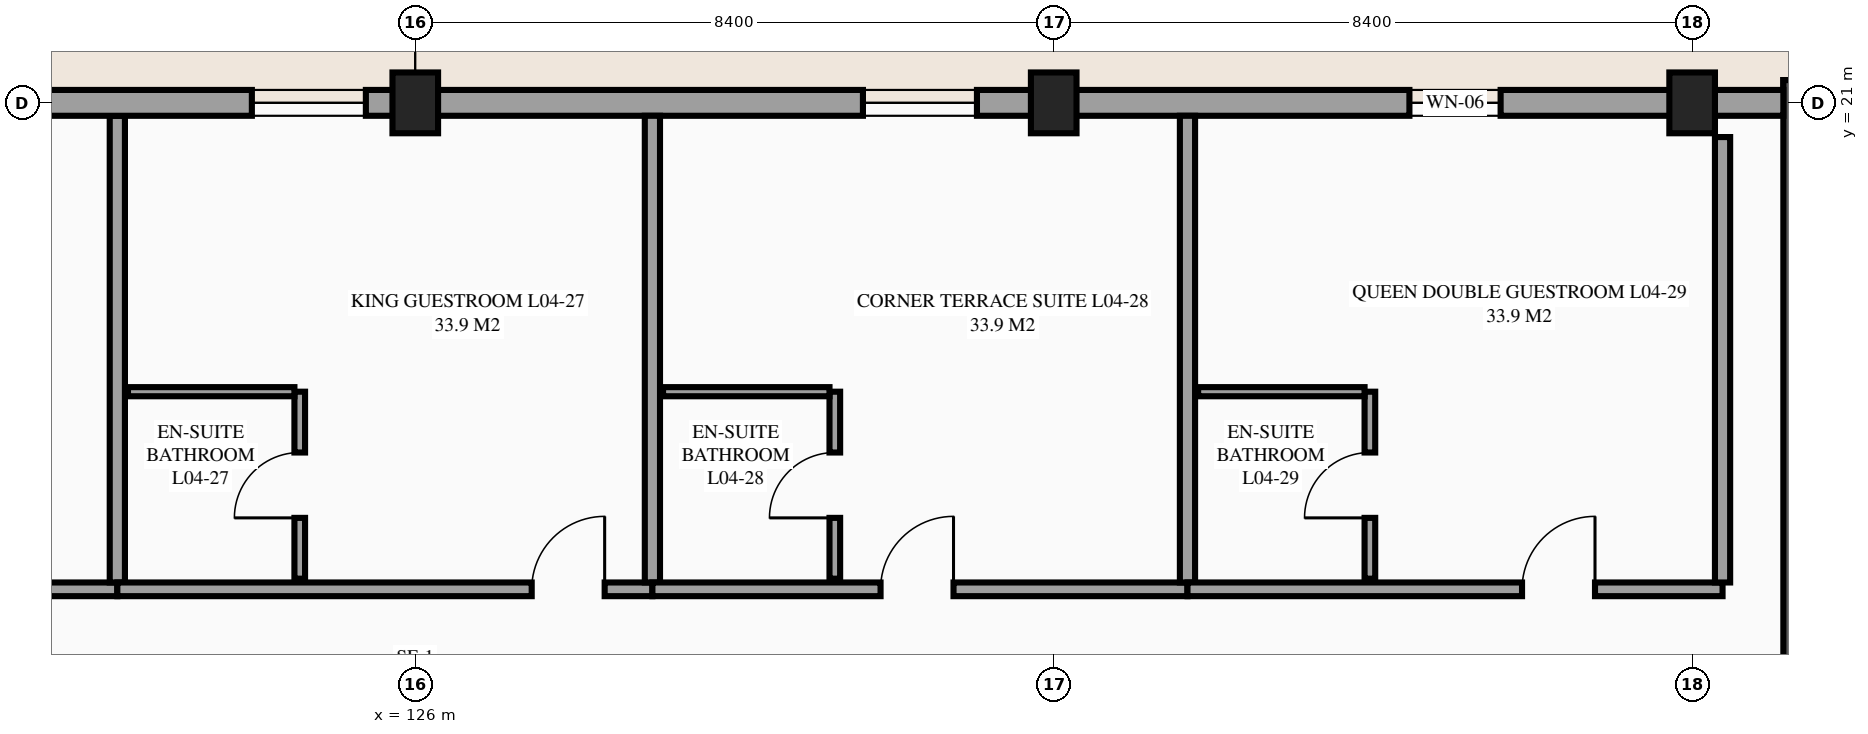
"""IFC4 building model, lengths in metres.
Left out: names, types, materials, properties, quantities, classifications, styles, units other than length and angle.
Written with IfcOpenShell. Run it as: python <this file> out.ifc"""

import sys

from ifc_helpers import new_model, si_unit, direction, frame, frame_2d, origin, origin_2d, place, context, subcontext, project, spatial, rectangle, extrude, element, fill, save


model = new_model("IFC4")
c1 = context("Model", 3, precision=1e-05, world=origin(), true_north=direction((0.0, 1.0)))
c2 = subcontext(c1, "Body", "Model", "MODEL_VIEW")
j1 = project(units=[si_unit("LENGTHUNIT", "METRE"), si_unit("PLANEANGLEUNIT", "RADIAN")], contexts=[c1])
p1 = place(None, origin())
s1 = spatial("IfcSite", under=j1, at=p1, CompositionType="ELEMENT")
p2 = place(p1, origin())
s2 = spatial("IfcBuilding", under=s1, at=p2, CompositionType="ELEMENT")
p3 = place(p2, frame((0.0, 0.0, 18.3)))
s3 = spatial("IfcBuildingStorey", under=s2, at=p3, CompositionType="ELEMENT", Elevation=18.3)
for number, where, z_axis, x_axis in (
    (1, (126.0, 21.0, 0.0), (0.0, 0.0, 1.0), (1.0, 0.0, 0.0)),
    (2, (134.4, 21.0, 0.0), (0.0, 0.0, 1.0), (1.0, 0.0, 0.0)),
    (3, (142.8, 21.0, 0.0), (0.0, 0.0, 1.0), (1.0, 0.0, 0.0)),
):
    element("IfcColumn", number, at=place(p3, frame(where, z_axis=z_axis, x_axis=x_axis)), inside=s3, PredefinedType="COLUMN", context=c2, shape_type="SweptSolid", body=[
        extrude(rectangle(XDim=0.6, YDim=0.8, at=origin_2d()), origin(), (0.0, 0.0, 1.0), 3.6),
    ])
p4 = place(p3, frame((142.8, 21.0, 0.0), z_axis=(0.0, 0.0, 1.0), x_axis=(-1.0, 0.0, 0.0)))
e4 = element("IfcWall", 4, at=p4, inside=s3, PredefinedType="STANDARD", context=c2, shape_type="SweptSolid", body=[
    extrude(rectangle(XDim=16.8, YDim=0.34, at=frame_2d((8.4, 0.0))), origin(), (0.0, 0.0, 1.0), 2.53),
])
p5 = place(p4, frame((9.41, 0.0, 0.85)))
e5 = element("IfcOpeningElement", 5, at=p5, cuts=e4, PredefinedType="OPENING", context=c2, shape_type="SweptSolid", body=[
    extrude(rectangle(XDim=1.5, YDim=1.5, at=frame_2d((0.75, 0.75))), frame((0.0, 0.18, 0.0), z_axis=(0.0, -1.0, 0.0), x_axis=(1.0, 0.0, 0.0)), (0.0, 0.0, 1.0), 0.36),
])
p6 = place(p4, frame((2.52, 0.0, 0.85)))
e6 = element("IfcOpeningElement", 6, at=p6, cuts=e4, PredefinedType="OPENING", context=c2, shape_type="SweptSolid", body=[
    extrude(rectangle(XDim=1.2, YDim=1.5, at=frame_2d((0.6, 0.75))), frame((0.0, 0.18, 0.0), z_axis=(0.0, -1.0, 0.0), x_axis=(1.0, 0.0, 0.0)), (0.0, 0.0, 1.0), 0.36),
])
p7 = place(p3, frame((149.2, 21.15, 0.0), z_axis=(0.0, 0.0, 1.0), x_axis=(-1.0, 0.0, 0.0)))
e7 = element("IfcWall", 7, at=p7, inside=s3, PredefinedType="SHEAR", context=c2, shape_type="SweptSolid", body=[
    extrude(rectangle(XDim=5.2, YDim=0.3, at=frame_2d((2.6, 0.0))), origin(), (0.0, 0.0, 1.0), 3.6),
])
p8 = place(p3, frame((144.15, 21.3, 0.0), z_axis=(0.0, 0.0, 1.0), x_axis=(0.0, -1.0, 0.0)))
e8 = element("IfcWall", 8, at=p8, inside=s3, PredefinedType="SHEAR", context=c2, shape_type="SweptSolid", body=[
    extrude(rectangle(XDim=8.84, YDim=0.3, at=frame_2d((4.42, 0.0))), origin(), (0.0, 0.0, 1.0), 3.6),
])
p9 = place(p3, frame((115.04, 14.6, 0.0), z_axis=(0.0, 0.0, 1.0), x_axis=(1.0, 0.0, 0.0)))
e9 = element("IfcWall", 9, at=p9, inside=s3, PredefinedType="PARTITIONING", context=c2, shape_type="SweptSolid", body=[
    extrude(rectangle(XDim=7.04, YDim=0.18, at=frame_2d((3.52, 0.0))), origin(), (0.0, 0.0, 1.0), 3.375),
])
p10 = place(p9, frame((4.752, 0.0, 0.0)))
e10 = element("IfcOpeningElement", 10, at=p10, cuts=e9, PredefinedType="OPENING", context=c2, shape_type="SweptSolid", body=[
    extrude(rectangle(XDim=0.96, YDim=2.15, at=frame_2d((0.48, 1.075))), frame((0.0, 0.1, 0.0), z_axis=(0.0, -1.0, 0.0), x_axis=(1.0, 0.0, 0.0)), (0.0, 0.0, 1.0), 0.2),
])
p11 = place(p3, frame((122.08, 14.69, 0.0), z_axis=(0.0, 0.0, 1.0), x_axis=(0.0, 1.0, 0.0)))
e11 = element("IfcWall", 11, at=p11, inside=s3, PredefinedType="PARTITIONING", context=c2, shape_type="SweptSolid", body=[
    extrude(rectangle(XDim=6.14, YDim=0.2, at=frame_2d((3.07, 0.0))), origin(), (0.0, 0.0, 1.0), 3.375),
])
p12 = place(p3, frame((122.08, 14.6, 0.0), z_axis=(0.0, 0.0, 1.0), x_axis=(1.0, 0.0, 0.0)))
e12 = element("IfcWall", 12, at=p12, inside=s3, PredefinedType="PARTITIONING", context=c2, shape_type="SweptSolid", body=[
    extrude(rectangle(XDim=7.04, YDim=0.18, at=frame_2d((3.52, 0.0))), origin(), (0.0, 0.0, 1.0), 3.375),
])
p13 = place(p12, frame((5.452, 0.0, 0.0)))
e13 = element("IfcOpeningElement", 13, at=p13, cuts=e12, PredefinedType="OPENING", context=c2, shape_type="SweptSolid", body=[
    extrude(rectangle(XDim=0.96, YDim=2.15, at=frame_2d((0.48, 1.075))), frame((0.0, 0.1, 0.0), z_axis=(0.0, -1.0, 0.0), x_axis=(1.0, 0.0, 0.0)), (0.0, 0.0, 1.0), 0.2),
])
p14 = place(p3, frame((129.12, 14.69, 0.0), z_axis=(0.0, 0.0, 1.0), x_axis=(0.0, 1.0, 0.0)))
e14 = element("IfcWall", 14, at=p14, inside=s3, PredefinedType="PARTITIONING", context=c2, shape_type="SweptSolid", body=[
    extrude(rectangle(XDim=6.14, YDim=0.2, at=frame_2d((3.07, 0.0))), origin(), (0.0, 0.0, 1.0), 3.375),
])
p15 = place(p3, frame((124.48, 14.74, 0.0), z_axis=(0.0, 0.0, 1.0), x_axis=(0.0, 1.0, 0.0)))
e15 = element("IfcWall", 15, at=p15, inside=s3, PredefinedType="PARTITIONING", context=c2, shape_type="SweptSolid", body=[
    extrude(rectangle(XDim=2.46, YDim=0.14, at=frame_2d((1.23, 0.0))), origin(), (0.0, 0.0, 1.0), 3.375),
])
p16 = place(p15, frame((0.8, 0.0, 0.0)))
e16 = element("IfcOpeningElement", 16, at=p16, cuts=e15, PredefinedType="OPENING", context=c2, shape_type="SweptSolid", body=[
    extrude(rectangle(XDim=0.86, YDim=2.1, at=frame_2d((0.43, 1.05))), frame((0.0, 0.08, 0.0), z_axis=(0.0, -1.0, 0.0), x_axis=(1.0, 0.0, 0.0)), (0.0, 0.0, 1.0), 0.16),
])
p17 = place(p3, frame((122.22, 17.2, 0.0), z_axis=(0.0, 0.0, 1.0), x_axis=(1.0, 0.0, 0.0)))
e17 = element("IfcWall", 17, at=p17, inside=s3, PredefinedType="PARTITIONING", context=c2, shape_type="SweptSolid", body=[
    extrude(rectangle(XDim=2.19, YDim=0.12, at=frame_2d((1.095, 0.0))), origin(), (0.0, 0.0, 1.0), 3.375),
])
p18 = place(p3, frame((129.12, 14.6, 0.0), z_axis=(0.0, 0.0, 1.0), x_axis=(1.0, 0.0, 0.0)))
e18 = element("IfcWall", 18, at=p18, inside=s3, PredefinedType="PARTITIONING", context=c2, shape_type="SweptSolid", body=[
    extrude(rectangle(XDim=7.04, YDim=0.18, at=frame_2d((3.52, 0.0))), origin(), (0.0, 0.0, 1.0), 3.375),
])
p19 = place(p18, frame((3.002, 0.0, 0.0)))
e19 = element("IfcOpeningElement", 19, at=p19, cuts=e18, PredefinedType="OPENING", context=c2, shape_type="SweptSolid", body=[
    extrude(rectangle(XDim=0.96, YDim=2.15, at=frame_2d((0.48, 1.075))), frame((0.0, 0.1, 0.0), z_axis=(0.0, -1.0, 0.0), x_axis=(1.0, 0.0, 0.0)), (0.0, 0.0, 1.0), 0.2),
])
p20 = place(p3, frame((136.16, 14.69, 0.0), z_axis=(0.0, 0.0, 1.0), x_axis=(0.0, 1.0, 0.0)))
e20 = element("IfcWall", 20, at=p20, inside=s3, PredefinedType="PARTITIONING", context=c2, shape_type="SweptSolid", body=[
    extrude(rectangle(XDim=6.14, YDim=0.2, at=frame_2d((3.07, 0.0))), origin(), (0.0, 0.0, 1.0), 3.375),
])
p21 = place(p3, frame((131.52, 14.74, 0.0), z_axis=(0.0, 0.0, 1.0), x_axis=(0.0, 1.0, 0.0)))
e21 = element("IfcWall", 21, at=p21, inside=s3, PredefinedType="PARTITIONING", context=c2, shape_type="SweptSolid", body=[
    extrude(rectangle(XDim=2.46, YDim=0.14, at=frame_2d((1.23, 0.0))), origin(), (0.0, 0.0, 1.0), 3.375),
])
p22 = place(p21, frame((0.8, 0.0, 0.0)))
e22 = element("IfcOpeningElement", 22, at=p22, cuts=e21, PredefinedType="OPENING", context=c2, shape_type="SweptSolid", body=[
    extrude(rectangle(XDim=0.86, YDim=2.1, at=frame_2d((0.43, 1.05))), frame((0.0, 0.08, 0.0), z_axis=(0.0, -1.0, 0.0), x_axis=(1.0, 0.0, 0.0)), (0.0, 0.0, 1.0), 0.16),
])
p23 = place(p3, frame((129.26, 17.2, 0.0), z_axis=(0.0, 0.0, 1.0), x_axis=(1.0, 0.0, 0.0)))
e23 = element("IfcWall", 23, at=p23, inside=s3, PredefinedType="PARTITIONING", context=c2, shape_type="SweptSolid", body=[
    extrude(rectangle(XDim=2.19, YDim=0.12, at=frame_2d((1.095, 0.0))), origin(), (0.0, 0.0, 1.0), 3.375),
])
p24 = place(p3, frame((136.16, 14.6, 0.0), z_axis=(0.0, 0.0, 1.0), x_axis=(1.0, 0.0, 0.0)))
e24 = element("IfcWall", 24, at=p24, inside=s3, PredefinedType="PARTITIONING", context=c2, shape_type="SweptSolid", body=[
    extrude(rectangle(XDim=7.04, YDim=0.18, at=frame_2d((3.52, 0.0))), origin(), (0.0, 0.0, 1.0), 3.375),
])
p25 = place(p24, frame((4.402, 0.0, 0.0)))
e25 = element("IfcOpeningElement", 25, at=p25, cuts=e24, PredefinedType="OPENING", context=c2, shape_type="SweptSolid", body=[
    extrude(rectangle(XDim=0.96, YDim=2.15, at=frame_2d((0.48, 1.075))), frame((0.0, 0.1, 0.0), z_axis=(0.0, -1.0, 0.0), x_axis=(1.0, 0.0, 0.0)), (0.0, 0.0, 1.0), 0.2),
])
p26 = place(p3, frame((143.2, 14.69, 0.0), z_axis=(0.0, 0.0, 1.0), x_axis=(0.0, 1.0, 0.0)))
e26 = element("IfcWall", 26, at=p26, inside=s3, PredefinedType="PARTITIONING", context=c2, shape_type="SweptSolid", body=[
    extrude(rectangle(XDim=5.86, YDim=0.2, at=frame_2d((2.93, 0.0))), origin(), (0.0, 0.0, 1.0), 3.375),
])
p27 = place(p3, frame((138.56, 14.74, 0.0), z_axis=(0.0, 0.0, 1.0), x_axis=(0.0, 1.0, 0.0)))
e27 = element("IfcWall", 27, at=p27, inside=s3, PredefinedType="PARTITIONING", context=c2, shape_type="SweptSolid", body=[
    extrude(rectangle(XDim=2.46, YDim=0.14, at=frame_2d((1.23, 0.0))), origin(), (0.0, 0.0, 1.0), 3.375),
])
p28 = place(p27, frame((0.8, 0.0, 0.0)))
e28 = element("IfcOpeningElement", 28, at=p28, cuts=e27, PredefinedType="OPENING", context=c2, shape_type="SweptSolid", body=[
    extrude(rectangle(XDim=0.86, YDim=2.1, at=frame_2d((0.43, 1.05))), frame((0.0, 0.08, 0.0), z_axis=(0.0, -1.0, 0.0), x_axis=(1.0, 0.0, 0.0)), (0.0, 0.0, 1.0), 0.16),
])
p29 = place(p3, frame((136.3, 17.2, 0.0), z_axis=(0.0, 0.0, 1.0), x_axis=(1.0, 0.0, 0.0)))
e29 = element("IfcWall", 29, at=p29, inside=s3, PredefinedType="PARTITIONING", context=c2, shape_type="SweptSolid", body=[
    extrude(rectangle(XDim=2.19, YDim=0.12, at=frame_2d((1.095, 0.0))), origin(), (0.0, 0.0, 1.0), 3.375),
])
p30 = place(p3, frame((144.0, 21.0, 0.0), z_axis=(0.0, 0.0, 1.0), x_axis=(-1.0, 0.0, 0.0)))
e30 = element("IfcWall", 30, at=p30, inside=s3, PredefinedType="STANDARD", context=c2, shape_type="SweptSolid", body=[
    extrude(rectangle(XDim=1.2, YDim=0.34, at=frame_2d((0.6, 0.0))), origin(), (0.0, 0.0, 1.0), 2.88),
])
p31 = place(p3, frame((126.0, 21.0, 0.0), z_axis=(0.0, 0.0, 1.0), x_axis=(-1.0, 0.0, 0.0)))
e31 = element("IfcWall", 31, at=p31, inside=s3, PredefinedType="STANDARD", context=c2, shape_type="SweptSolid", body=[
    extrude(rectangle(XDim=8.4, YDim=0.34, at=frame_2d((4.2, 0.0))), origin(), (0.0, 0.0, 1.0), 3.133),
])
p32 = place(p31, frame((6.19, 0.0, 0.85)))
e32 = element("IfcOpeningElement", 32, at=p32, cuts=e31, PredefinedType="OPENING", context=c2, shape_type="SweptSolid", body=[
    extrude(rectangle(XDim=1.5, YDim=1.5, at=frame_2d((0.75, 0.75))), frame((0.0, 0.18, 0.0), z_axis=(0.0, -1.0, 0.0), x_axis=(1.0, 0.0, 0.0)), (0.0, 0.0, 1.0), 0.36),
])
p33 = place(p31, frame((0.65, 0.0, 0.85)))
e33 = element("IfcOpeningElement", 33, at=p33, cuts=e31, PredefinedType="OPENING", context=c2, shape_type="SweptSolid", body=[
    extrude(rectangle(XDim=1.5, YDim=1.5, at=frame_2d((0.75, 0.75))), frame((0.0, 0.18, 0.0), z_axis=(0.0, -1.0, 0.0), x_axis=(1.0, 0.0, 0.0)), (0.0, 0.0, 1.0), 0.36),
])
p34 = place(p33, origin())
e34 = element("IfcWindow", 34, at=p34, inside=s3, PartitioningType="SINGLE_PANEL", PredefinedType="WINDOW", context=c2, shape_type="SweptSolid", body=[
    extrude(rectangle(XDim=1.5, YDim=1.5, at=frame_2d((0.75, 0.75))), frame((0.0, 0.03, 0.0), z_axis=(0.0, -1.0, 0.0), x_axis=(1.0, 0.0, 0.0)), (0.0, 0.0, 1.0), 0.06),
])
fill(e33, e34)
p35 = place(p5, origin())
e35 = element("IfcWindow", 35, at=p35, inside=s3, PartitioningType="SINGLE_PANEL", PredefinedType="WINDOW", context=c2, shape_type="SweptSolid", body=[
    extrude(rectangle(XDim=1.5, YDim=1.5, at=frame_2d((0.75, 0.75))), frame((0.0, 0.03, 0.0), z_axis=(0.0, -1.0, 0.0), x_axis=(1.0, 0.0, 0.0)), (0.0, 0.0, 1.0), 0.06),
])
fill(e5, e35)
p36 = place(p6, origin())
e36 = element("IfcWindow", 36, at=p36, inside=s3, PartitioningType="SINGLE_PANEL", PredefinedType="WINDOW", context=c2, shape_type="SweptSolid", body=[
    extrude(rectangle(XDim=1.2, YDim=1.5, at=frame_2d((0.6, 0.75))), frame((0.0, 0.03, 0.0), z_axis=(0.0, -1.0, 0.0), x_axis=(1.0, 0.0, 0.0)), (0.0, 0.0, 1.0), 0.06),
])
fill(e6, e36)
p37 = place(p13, origin())
e37 = element("IfcDoor", 37, at=p37, inside=s3, OperationType="SINGLE_SWING_RIGHT", PredefinedType="DOOR", context=c2, shape_type="SweptSolid", body=[
    extrude(rectangle(XDim=0.96, YDim=2.15, at=frame_2d((0.48, 1.075))), frame((0.0, 0.025, 0.0), z_axis=(0.0, -1.0, 0.0), x_axis=(1.0, 0.0, 0.0)), (0.0, 0.0, 1.0), 0.05),
])
fill(e13, e37)
p38 = place(p16, origin())
e38 = element("IfcDoor", 38, at=p38, inside=s3, OperationType="SINGLE_SWING_LEFT", PredefinedType="DOOR", context=c2, shape_type="SweptSolid", body=[
    extrude(rectangle(XDim=0.86, YDim=2.1, at=frame_2d((0.43, 1.05))), frame((0.0, 0.025, 0.0), z_axis=(0.0, -1.0, 0.0), x_axis=(1.0, 0.0, 0.0)), (0.0, 0.0, 1.0), 0.05),
])
fill(e16, e38)
p39 = place(p19, origin())
e39 = element("IfcDoor", 39, at=p39, inside=s3, OperationType="SINGLE_SWING_RIGHT", PredefinedType="DOOR", context=c2, shape_type="SweptSolid", body=[
    extrude(rectangle(XDim=0.96, YDim=2.15, at=frame_2d((0.48, 1.075))), frame((0.0, 0.025, 0.0), z_axis=(0.0, -1.0, 0.0), x_axis=(1.0, 0.0, 0.0)), (0.0, 0.0, 1.0), 0.05),
])
fill(e19, e39)
p40 = place(p22, origin())
e40 = element("IfcDoor", 40, at=p40, inside=s3, OperationType="SINGLE_SWING_LEFT", PredefinedType="DOOR", context=c2, shape_type="SweptSolid", body=[
    extrude(rectangle(XDim=0.86, YDim=2.1, at=frame_2d((0.43, 1.05))), frame((0.0, 0.025, 0.0), z_axis=(0.0, -1.0, 0.0), x_axis=(1.0, 0.0, 0.0)), (0.0, 0.0, 1.0), 0.05),
])
fill(e22, e40)
p41 = place(p25, origin())
e41 = element("IfcDoor", 41, at=p41, inside=s3, OperationType="SINGLE_SWING_RIGHT", PredefinedType="DOOR", context=c2, shape_type="SweptSolid", body=[
    extrude(rectangle(XDim=0.96, YDim=2.15, at=frame_2d((0.48, 1.075))), frame((0.0, 0.025, 0.0), z_axis=(0.0, -1.0, 0.0), x_axis=(1.0, 0.0, 0.0)), (0.0, 0.0, 1.0), 0.05),
])
fill(e25, e41)
p42 = place(p28, origin())
e42 = element("IfcDoor", 42, at=p42, inside=s3, OperationType="SINGLE_SWING_LEFT", PredefinedType="DOOR", context=c2, shape_type="SweptSolid", body=[
    extrude(rectangle(XDim=0.86, YDim=2.1, at=frame_2d((0.43, 1.05))), frame((0.0, 0.025, 0.0), z_axis=(0.0, -1.0, 0.0), x_axis=(1.0, 0.0, 0.0)), (0.0, 0.0, 1.0), 0.05),
])
fill(e28, e42)
save(model, sys.argv[1])
